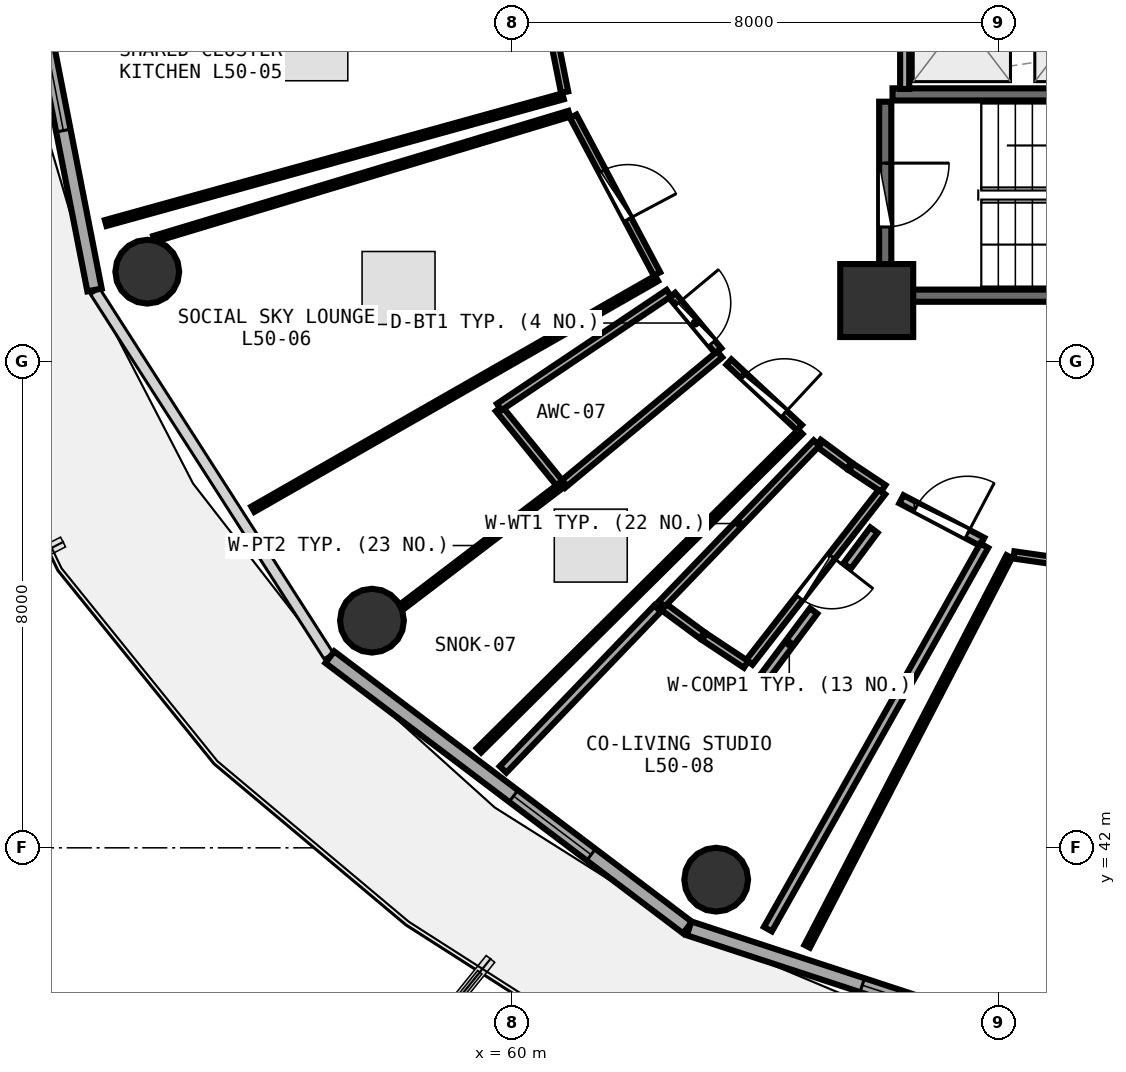
"""IFC4 building model, lengths in metres.
Left out: names, types, materials, properties, quantities, classifications, styles, units other than length and angle.
Written with IfcOpenShell. Run it as: python <this file> out.ifc"""

import sys

from ifc_helpers import new_model, si_unit, direction, frame, frame_2d, origin, origin_2d, place, context, subcontext, project, spatial, rectangle, circle, extrude, element, fill, save


model = new_model("IFC4")
c1 = context("Model", 3, precision=1e-05, world=origin(), true_north=direction((0.0, 1.0)))
c2 = subcontext(c1, "Body", "Model", "MODEL_VIEW")
j1 = project(units=[si_unit("LENGTHUNIT", "METRE"), si_unit("PLANEANGLEUNIT", "RADIAN")], contexts=[c1])
p1 = place(None, origin())
s1 = spatial("IfcSite", under=j1, at=p1, CompositionType="ELEMENT")
p2 = place(p1, origin())
s2 = spatial("IfcBuilding", under=s1, at=p2, CompositionType="ELEMENT")
p3 = place(p2, frame((0.0, 0.0, 196.95)))
s3 = spatial("IfcBuildingStorey", under=s2, at=p3, CompositionType="ELEMENT", Elevation=196.95)
p4 = place(p3, frame((66.0, 51.0, 0.0), z_axis=(0.0, 0.0, 1.0), x_axis=(1.0, 0.0, 0.0)))
e1 = element("IfcColumn", 1, at=p4, inside=s3, PredefinedType="PILASTER", context=c2, shape_type="SweptSolid", body=[
    extrude(rectangle(XDim=1.2, YDim=1.2, at=origin_2d()), origin(), (0.0, 0.0, 1.0), 3.75),
])
for number, where, z_axis, x_axis in (
    (2, (54.003, 51.474, 0.0), (0.0, 0.0, 1.0), (1.0, 0.0, 0.0)),
    (3, (57.698, 45.736, 0.0), (0.0, 0.0, 1.0), (1.0, 0.0, 0.0)),
    (4, (63.36, 41.476, 0.0), (0.0, 0.0, 1.0), (1.0, 0.0, 0.0)),
):
    element("IfcColumn", number, at=place(p3, frame(where, z_axis=z_axis, x_axis=x_axis)), inside=s3, PredefinedType="COLUMN", context=c2, shape_type="SweptSolid", body=[
        extrude(circle(Radius=0.525, at=origin_2d()), origin(), (0.0, 0.0, 1.0), 3.75),
    ])
p5 = place(p3, frame((51.803, 57.985, 0.0), z_axis=(0.0, 0.0, 1.0), x_axis=(0.192069055673, -0.981381413036, 0.0)))
e5 = element("IfcWall", 5, at=p5, inside=s3, PredefinedType="SOLIDWALL", context=c2, shape_type="SweptSolid", body=[
    extrude(rectangle(XDim=6.94, YDim=0.24, at=frame_2d((3.47, 0.0))), origin(), (0.0, 0.0, 1.0), 3.475),
])
p6 = place(p5, frame((2.67, 0.0, 0.85)))
e6 = element("IfcOpeningElement", 6, at=p6, cuts=e5, PredefinedType="OPENING", context=c2, shape_type="SweptSolid", body=[
    extrude(rectangle(XDim=1.6, YDim=1.45, at=frame_2d((0.8, 0.725))), frame((0.0, 0.13, 0.0), z_axis=(0.0, -1.0, 0.0), x_axis=(1.0, 0.0, 0.0)), (0.0, 0.0, 1.0), 0.26),
])
p7 = place(p3, frame((57.006, 45.135, 0.0), z_axis=(0.0, 0.0, 1.0), x_axis=(0.797701674595, -0.603052268338, 0.0)))
e7 = element("IfcWall", 7, at=p7, inside=s3, PredefinedType="SOLIDWALL", context=c2, shape_type="SweptSolid", body=[
    extrude(rectangle(XDim=7.374, YDim=0.24, at=frame_2d((3.687, 0.0))), origin(), (0.0, 0.0, 1.0), 3.475),
])
p8 = place(p7, frame((3.787, 0.0, 0.85)))
e8 = element("IfcOpeningElement", 8, at=p8, cuts=e7, PredefinedType="OPENING", context=c2, shape_type="SweptSolid", body=[
    extrude(rectangle(XDim=1.6, YDim=1.45, at=frame_2d((0.8, 0.725))), frame((0.0, 0.13, 0.0), z_axis=(0.0, -1.0, 0.0), x_axis=(1.0, 0.0, 0.0)), (0.0, 0.0, 1.0), 0.26),
])
p9 = place(p3, frame((62.914, 40.675, 0.0), z_axis=(0.0, 0.0, 1.0), x_axis=(0.95022142767, -0.31157541366, 0.0)))
e9 = element("IfcWall", 9, at=p9, inside=s3, PredefinedType="SOLIDWALL", context=c2, shape_type="SweptSolid", body=[
    extrude(rectangle(XDim=7.594, YDim=0.24, at=frame_2d((3.797, 0.0))), origin(), (0.0, 0.0, 1.0), 3.475),
])
p10 = place(p9, frame((2.997, 0.0, 0.85)))
e10 = element("IfcOpeningElement", 10, at=p10, cuts=e9, PredefinedType="OPENING", context=c2, shape_type="SweptSolid", body=[
    extrude(rectangle(XDim=1.6, YDim=1.45, at=frame_2d((0.8, 0.725))), frame((0.0, 0.13, 0.0), z_axis=(0.0, -1.0, 0.0), x_axis=(1.0, 0.0, 0.0)), (0.0, 0.0, 1.0), 0.26),
])
for number, where, z_axis, x_axis in (
    (11, (66.26, 51.08, 0.0), (0.0, 0.0, 1.0), (1.0, 0.0, 0.0)),
    (12, (73.42, 54.39, 0.0), (0.0, 0.0, 1.0), (-1.0, 0.0, 0.0)),
):
    element("IfcWall", number, at=place(p3, frame(where, z_axis=z_axis, x_axis=x_axis)), inside=s3, PredefinedType="SHEAR", context=c2, shape_type="SweptSolid", body=[
        extrude(rectangle(XDim=7.16, YDim=0.2, at=frame_2d((3.58, 0.0))), origin(), (0.0, 0.0, 1.0), 3.49),
    ])
p11 = place(p3, frame((66.14, 54.27, 0.0), z_axis=(0.0, 0.0, 1.0), x_axis=(0.0, -1.0, 0.0)))
e13 = element("IfcWall", 13, at=p11, inside=s3, PredefinedType="SHEAR", context=c2, shape_type="SweptSolid", body=[
    extrude(rectangle(XDim=3.07, YDim=0.2, at=frame_2d((1.535, 0.0))), origin(), (0.0, 0.0, 1.0), 3.49),
])
p12 = place(p11, frame((1.01, 0.0, 0.0)))
e14 = element("IfcOpeningElement", 14, at=p12, cuts=e13, PredefinedType="OPENING", context=c2, shape_type="SweptSolid", body=[
    extrude(rectangle(XDim=1.05, YDim=2.1, at=frame_2d((0.525, 1.05))), frame((0.0, 0.11, 0.0), z_axis=(0.0, -1.0, 0.0), x_axis=(1.0, 0.0, 0.0)), (0.0, 0.0, 1.0), 0.22),
])
p13 = place(p3, frame((66.46, 54.48, 0.0), z_axis=(0.0, 0.0, 1.0), x_axis=(0.0, 1.0, 0.0)))
e15 = element("IfcWall", 15, at=p13, inside=s3, PredefinedType="PARTITIONING", context=c2, shape_type="SweptSolid", body=[
    extrude(rectangle(XDim=2.29, YDim=0.15, at=frame_2d((1.145, 0.0))), origin(), (0.0, 0.0, 1.0), 3.48),
])
p14 = place(p3, frame((68.256, 46.816, 0.0), z_axis=(0.0, 0.0, 1.0), x_axis=(0.989926410659, -0.141582843167, 0.0)))
e16 = element("IfcWall", 16, at=p14, inside=s3, PredefinedType="PARTITIONING", context=c2, shape_type="SweptSolid", body=[
    extrude(rectangle(XDim=7.408, YDim=0.12, at=frame_2d((3.704, 0.0))), origin(), (0.0, 0.0, 1.0), 3.025),
])
p15 = place(p14, frame((3.254, 0.0, 0.0)))
e17 = element("IfcOpeningElement", 17, at=p15, cuts=e16, PredefinedType="OPENING", context=c2, shape_type="SweptSolid", body=[
    extrude(rectangle(XDim=0.9, YDim=2.08, at=frame_2d((0.45, 1.04))), frame((0.0, 0.07, 0.0), z_axis=(0.0, -1.0, 0.0), x_axis=(1.0, 0.0, 0.0)), (0.0, 0.0, 1.0), 0.14),
])
p16 = place(p3, frame((60.303, 57.253, 0.0), z_axis=(0.0, 0.0, 1.0), x_axis=(0.195904296331, -0.980623019656, 0.0)))
e18 = element("IfcWall", 18, at=p16, inside=s3, PredefinedType="PARTITIONING", context=c2, shape_type="SweptSolid", body=[
    extrude(rectangle(XDim=2.881, YDim=0.12, at=frame_2d((1.441, 0.0))), origin(), (0.0, 0.0, 1.0), 3.48),
])
p17 = place(p16, frame((0.991, 0.0, 0.0)))
e19 = element("IfcOpeningElement", 19, at=p17, cuts=e18, PredefinedType="OPENING", context=c2, shape_type="SweptSolid", body=[
    extrude(rectangle(XDim=0.9, YDim=2.08, at=frame_2d((0.45, 1.04))), frame((0.0, 0.07, 0.0), z_axis=(0.0, -1.0, 0.0), x_axis=(1.0, 0.0, 0.0)), (0.0, 0.0, 1.0), 0.14),
])
p18 = place(p3, frame((61.009, 54.03, 0.0), z_axis=(0.0, 0.0, 1.0), x_axis=(0.468999166779, -0.883198608219, 0.0)))
e20 = element("IfcWall", 20, at=p18, inside=s3, PredefinedType="PARTITIONING", context=c2, shape_type="SweptSolid", body=[
    extrude(rectangle(XDim=2.936, YDim=0.12, at=frame_2d((1.468, 0.0))), origin(), (0.0, 0.0, 1.0), 3.235),
])
p19 = place(p18, frame((1.018, 0.0, 0.0)))
e21 = element("IfcOpeningElement", 21, at=p19, cuts=e20, PredefinedType="OPENING", context=c2, shape_type="SweptSolid", body=[
    extrude(rectangle(XDim=0.9, YDim=2.08, at=frame_2d((0.45, 1.04))), frame((0.0, 0.07, 0.0), z_axis=(0.0, -1.0, 0.0), x_axis=(1.0, 0.0, 0.0)), (0.0, 0.0, 1.0), 0.14),
])
p20 = place(p3, frame((62.635, 51.086, 0.0), z_axis=(0.0, 0.0, 1.0), x_axis=(0.639759255057, -0.768575367526, 0.0)))
e22 = element("IfcWall", 22, at=p20, inside=s3, PredefinedType="PLUMBINGWALL", context=c2, shape_type="SweptSolid", body=[
    extrude(rectangle(XDim=1.187, YDim=0.13, at=frame_2d((0.593, 0.0))), origin(), (0.0, 0.0, 1.0), 3.025),
])
p21 = place(p20, frame((0.163, 0.0, 0.0)))
e23 = element("IfcOpeningElement", 23, at=p21, cuts=e22, PredefinedType="OPENING", context=c2, shape_type="SweptSolid", body=[
    extrude(rectangle(XDim=0.86, YDim=2.05, at=frame_2d((0.43, 1.025))), frame((0.0, 0.075, 0.0), z_axis=(0.0, -1.0, 0.0), x_axis=(1.0, 0.0, 0.0)), (0.0, 0.0, 1.0), 0.15),
])
p22 = place(p3, frame((63.569, 49.988, 0.0), z_axis=(0.0, 0.0, 1.0), x_axis=(0.732453034456, -0.680817561698, 0.0)))
e24 = element("IfcWall", 24, at=p22, inside=s3, PredefinedType="PARTITIONING", context=c2, shape_type="SweptSolid", body=[
    extrude(rectangle(XDim=1.584, YDim=0.12, at=frame_2d((0.792, 0.0))), origin(), (0.0, 0.0, 1.0), 3.025),
])
p23 = place(p22, frame((0.342, 0.0, 0.0)))
e25 = element("IfcOpeningElement", 25, at=p23, cuts=e24, PredefinedType="OPENING", context=c2, shape_type="SweptSolid", body=[
    extrude(rectangle(XDim=0.9, YDim=2.08, at=frame_2d((0.45, 1.04))), frame((0.0, 0.07, 0.0), z_axis=(0.0, -1.0, 0.0), x_axis=(1.0, 0.0, 0.0)), (0.0, 0.0, 1.0), 0.14),
])
p24 = place(p3, frame((66.088, 47.853, 0.0), z_axis=(0.0, 0.0, 1.0), x_axis=(-0.614711227896, -0.788752246462, 0.0)))
e26 = element("IfcWall", 26, at=p24, inside=s3, PredefinedType="PLUMBINGWALL", context=c2, shape_type="SweptSolid", body=[
    extrude(rectangle(XDim=3.552, YDim=0.13, at=frame_2d((1.776, 0.0))), origin(), (0.0, 0.0, 1.0), 3.025),
])
p25 = place(p24, frame((1.346, 0.0, 0.0)))
e27 = element("IfcOpeningElement", 27, at=p25, cuts=e26, PredefinedType="OPENING", context=c2, shape_type="SweptSolid", body=[
    extrude(rectangle(XDim=0.86, YDim=2.05, at=frame_2d((0.43, 1.025))), frame((0.0, 0.075, 0.0), z_axis=(0.0, -1.0, 0.0), x_axis=(1.0, 0.0, 0.0)), (0.0, 0.0, 1.0), 0.15),
])
p26 = place(p3, frame((66.406, 47.732, 0.0), z_axis=(0.0, 0.0, 1.0), x_axis=(0.884766555002, -0.466034487083, 0.0)))
e28 = element("IfcWall", 28, at=p26, inside=s3, PredefinedType="PARTITIONING", context=c2, shape_type="SweptSolid", body=[
    extrude(rectangle(XDim=1.502, YDim=0.15, at=frame_2d((0.751, 0.0))), origin(), (0.0, 0.0, 1.0), 3.235),
])
p27 = place(p26, frame((0.276, 0.0, 0.0)))
e29 = element("IfcOpeningElement", 29, at=p27, cuts=e28, PredefinedType="OPENING", context=c2, shape_type="SweptSolid", body=[
    extrude(rectangle(XDim=0.95, YDim=2.08, at=frame_2d((0.475, 1.04))), frame((0.0, 0.085, 0.0), z_axis=(0.0, -1.0, 0.0), x_axis=(1.0, 0.0, 0.0)), (0.0, 0.0, 1.0), 0.17),
])
p28 = place(p3, frame((64.856, 40.381, 0.0), z_axis=(0.0, 0.0, 1.0), x_axis=(0.460220418691, 0.887804689231, 0.0)))
e30 = element("IfcWall", 30, at=p28, inside=s3, PredefinedType="PARTITIONING", context=c2, shape_type="SweptSolid", body=[
    extrude(rectangle(XDim=7.219, YDim=0.1, at=frame_2d((3.609, 0.0))), origin(), (0.0, 0.0, 1.0), 3.075),
])
p29 = place(p3, frame((60.841, 54.358, 0.0), z_axis=(0.0, 0.0, 1.0), x_axis=(-0.963696964369, -0.266998428582, 0.0)))
e31 = element("IfcWall", 31, at=p29, inside=s3, PredefinedType="PARTITIONING", context=c2, shape_type="SweptSolid", body=[
    extrude(rectangle(XDim=7.804, YDim=0.1, at=frame_2d((3.902, 0.0))), origin(), (0.0, 0.0, 1.0), 3.075),
])
p30 = place(p3, frame((62.379, 51.364, 0.0), z_axis=(0.0, 0.0, 1.0), x_axis=(-0.868127220156, -0.496341746808, 0.0)))
e32 = element("IfcWall", 32, at=p30, inside=s3, PredefinedType="PARTITIONING", context=c2, shape_type="SweptSolid", body=[
    extrude(rectangle(XDim=7.648, YDim=0.1, at=frame_2d((3.824, 0.0))), origin(), (0.0, 0.0, 1.0), 3.025),
])
p31 = place(p3, frame((54.114, 52.013, 0.0), z_axis=(0.0, 0.0, 1.0), x_axis=(0.957454305291, 0.288584915198, 0.0)))
e33 = element("IfcWall", 33, at=p31, inside=s3, PredefinedType="PARTITIONING", context=c2, shape_type="SweptSolid", body=[
    extrude(rectangle(XDim=7.133, YDim=0.1, at=frame_2d((3.566, 0.0))), origin(), (0.0, 0.0, 1.0), 3.075),
])
p32 = place(p3, frame((63.417, 50.115, 0.0), z_axis=(0.0, 0.0, 1.0), x_axis=(-0.76963081868, -0.638489156477, 0.0)))
e34 = element("IfcWall", 34, at=p32, inside=s3, PredefinedType="PLUMBINGWALL", context=c2, shape_type="SweptSolid", body=[
    extrude(rectangle(XDim=3.36, YDim=0.13, at=frame_2d((1.68, 0.0))), origin(), (0.0, 0.0, 1.0), 3.175),
])
p33 = place(p3, frame((60.803, 47.972, 0.0), z_axis=(0.0, 0.0, 1.0), x_axis=(-0.631048835574, 0.775743106396, 0.0)))
e35 = element("IfcWall", 35, at=p33, inside=s3, PredefinedType="PLUMBINGWALL", context=c2, shape_type="SweptSolid", body=[
    extrude(rectangle(XDim=1.611, YDim=0.13, at=frame_2d((0.806, 0.0))), origin(), (0.0, 0.0, 1.0), 3.175),
])
p34 = place(p3, frame((59.791, 49.249, 0.0), z_axis=(0.0, 0.0, 1.0), x_axis=(0.830403176275, 0.557162960751, 0.0)))
e36 = element("IfcWall", 36, at=p34, inside=s3, PredefinedType="PLUMBINGWALL", context=c2, shape_type="SweptSolid", body=[
    extrude(rectangle(XDim=3.36, YDim=0.13, at=frame_2d((1.68, 0.0))), origin(), (0.0, 0.0, 1.0), 3.025),
])
p35 = place(p3, frame((64.745, 48.841, 0.0), z_axis=(0.0, 0.0, 1.0), x_axis=(-0.710363664194, -0.703834827635, 0.0)))
e37 = element("IfcWall", 37, at=p35, inside=s3, PredefinedType="PARTITIONING", context=c2, shape_type="SweptSolid", body=[
    extrude(rectangle(XDim=7.441, YDim=0.1, at=frame_2d((3.721, 0.0))), origin(), (0.0, 0.0, 1.0), 3.075),
])
p36 = place(p3, frame((58.197, 45.969, 0.0), z_axis=(0.0, 0.0, 1.0), x_axis=(0.79535379018, 0.606145484555, 0.0)))
e38 = element("IfcWall", 38, at=p36, inside=s3, PredefinedType="PARTITIONING", context=c2, shape_type="SweptSolid", body=[
    extrude(rectangle(XDim=3.308, YDim=0.1, at=frame_2d((1.654, 0.0))), origin(), (0.0, 0.0, 1.0), 3.025),
])
p37 = place(p3, frame((65.04, 48.658, 0.0), z_axis=(0.0, 0.0, 1.0), x_axis=(0.804987739936, -0.593291444867, 0.0)))
e39 = element("IfcWall", 39, at=p37, inside=s3, PredefinedType="PLUMBINGWALL", context=c2, shape_type="SweptSolid", body=[
    extrude(rectangle(XDim=0.631, YDim=0.13, at=frame_2d((0.315, 0.0))), origin(), (0.0, 0.0, 1.0), 3.025),
])
p38 = place(p3, frame((65.581, 48.261, 0.0), z_axis=(0.0, 0.0, 1.0), x_axis=(0.83341242139, -0.55265155014, 0.0)))
e40 = element("IfcWall", 40, at=p38, inside=s3, PredefinedType="PLUMBINGWALL", context=c2, shape_type="SweptSolid", body=[
    extrude(rectangle(XDim=0.633, YDim=0.13, at=frame_2d((0.316, 0.0))), origin(), (0.0, 0.0, 1.0), 3.48),
])
p39 = place(p3, frame((63.851, 45.015, 0.0), z_axis=(0.0, 0.0, 1.0), x_axis=(-0.833365951339, 0.552721621749, 0.0)))
e41 = element("IfcWall", 41, at=p39, inside=s3, PredefinedType="PLUMBINGWALL", context=c2, shape_type="SweptSolid", body=[
    extrude(rectangle(XDim=0.826, YDim=0.13, at=frame_2d((0.413, 0.0))), origin(), (0.0, 0.0, 1.0), 3.48),
])
p40 = place(p3, frame((63.13, 45.495, 0.0), z_axis=(0.0, 0.0, 1.0), x_axis=(-0.805130367536, 0.593097876638, 0.0)))
e42 = element("IfcWall", 42, at=p40, inside=s3, PredefinedType="PLUMBINGWALL", context=c2, shape_type="SweptSolid", body=[
    extrude(rectangle(XDim=0.823, YDim=0.13, at=frame_2d((0.412, 0.0))), origin(), (0.0, 0.0, 1.0), 3.48),
])
p41 = place(p3, frame((62.465, 46.01, 0.0), z_axis=(0.0, 0.0, 1.0), x_axis=(0.693241598237, 0.720705270186, 0.0)))
e43 = element("IfcWall", 43, at=p41, inside=s3, PredefinedType="PLUMBINGWALL", context=c2, shape_type="SweptSolid", body=[
    extrude(rectangle(XDim=3.671, YDim=0.13, at=frame_2d((1.836, 0.0))), origin(), (0.0, 0.0, 1.0), 3.175),
])
p42 = place(p3, frame((67.768, 46.969, 0.0), z_axis=(0.0, 0.0, 1.0), x_axis=(-0.491338239217, -0.870968848285, 0.0)))
e44 = element("IfcWall", 44, at=p42, inside=s3, PredefinedType="PARTITIONING", context=c2, shape_type="SweptSolid", body=[
    extrude(rectangle(XDim=7.241, YDim=0.15, at=frame_2d((3.62, 0.0))), origin(), (0.0, 0.0, 1.0), 3.075),
])
p43 = place(p3, frame((59.855, 43.288, 0.0), z_axis=(0.0, 0.0, 1.0), x_axis=(0.692562282737, 0.72135808343, 0.0)))
e45 = element("IfcWall", 45, at=p43, inside=s3, PredefinedType="PARTITIONING", context=c2, shape_type="SweptSolid", body=[
    extrude(rectangle(XDim=3.671, YDim=0.15, at=frame_2d((1.835, 0.0))), origin(), (0.0, 0.0, 1.0), 3.075),
])
p44 = place(p3, frame((64.162, 44.823, 0.0), z_axis=(0.0, 0.0, 1.0), x_axis=(0.597925227294, 0.801551883889, 0.0)))
e46 = element("IfcWall", 46, at=p44, inside=s3, PredefinedType="PARTITIONING", context=c2, shape_type="SweptSolid", body=[
    extrude(rectangle(XDim=1.338, YDim=0.15, at=frame_2d((0.669, 0.0))), origin(), (0.0, 0.0, 1.0), 3.025),
])
p45 = place(p3, frame((65.512, 46.633, 0.0), z_axis=(0.0, 0.0, 1.0), x_axis=(0.598093921347, 0.801426017327, 0.0)))
e47 = element("IfcWall", 47, at=p45, inside=s3, PredefinedType="PARTITIONING", context=c2, shape_type="SweptSolid", body=[
    extrude(rectangle(XDim=0.739, YDim=0.15, at=frame_2d((0.369, 0.0))), origin(), (0.0, 0.0, 1.0), 3.235),
])
p46 = place(p6, origin())
e48 = element("IfcWindow", 48, at=p46, inside=s3, PartitioningType="SINGLE_PANEL", PredefinedType="WINDOW", context=c2, shape_type="SweptSolid", body=[
    extrude(rectangle(XDim=1.6, YDim=1.45, at=frame_2d((0.8, 0.725))), frame((0.0, 0.03, 0.0), z_axis=(0.0, -1.0, 0.0), x_axis=(1.0, 0.0, 0.0)), (0.0, 0.0, 1.0), 0.06),
])
fill(e6, e48)
p47 = place(p8, origin())
e49 = element("IfcWindow", 49, at=p47, inside=s3, PartitioningType="SINGLE_PANEL", PredefinedType="WINDOW", context=c2, shape_type="SweptSolid", body=[
    extrude(rectangle(XDim=1.6, YDim=1.45, at=frame_2d((0.8, 0.725))), frame((0.0, 0.03, 0.0), z_axis=(0.0, -1.0, 0.0), x_axis=(1.0, 0.0, 0.0)), (0.0, 0.0, 1.0), 0.06),
])
fill(e8, e49)
p48 = place(p10, origin())
e50 = element("IfcWindow", 50, at=p48, inside=s3, PartitioningType="SINGLE_PANEL", PredefinedType="WINDOW", context=c2, shape_type="SweptSolid", body=[
    extrude(rectangle(XDim=1.6, YDim=1.45, at=frame_2d((0.8, 0.725))), frame((0.0, 0.03, 0.0), z_axis=(0.0, -1.0, 0.0), x_axis=(1.0, 0.0, 0.0)), (0.0, 0.0, 1.0), 0.06),
])
fill(e10, e50)
p49 = place(p12, origin())
e51 = element("IfcDoor", 51, at=p49, inside=s3, OperationType="SINGLE_SWING_LEFT", PredefinedType="DOOR", context=c2, shape_type="SweptSolid", body=[
    extrude(rectangle(XDim=1.05, YDim=2.1, at=frame_2d((0.525, 1.05))), frame((0.0, 0.025, 0.0), z_axis=(0.0, -1.0, 0.0), x_axis=(1.0, 0.0, 0.0)), (0.0, 0.0, 1.0), 0.05),
])
fill(e14, e51)
p50 = place(p19, origin())
e52 = element("IfcDoor", 52, at=p50, inside=s3, OperationType="SINGLE_SWING_RIGHT", PredefinedType="DOOR", context=c2, shape_type="SweptSolid", body=[
    extrude(rectangle(XDim=0.9, YDim=2.08, at=frame_2d((0.45, 1.04))), frame((0.0, 0.025, 0.0), z_axis=(0.0, -1.0, 0.0), x_axis=(1.0, 0.0, 0.0)), (0.0, 0.0, 1.0), 0.05),
])
fill(e21, e52)
p51 = place(p21, origin())
e53 = element("IfcDoor", 53, at=p51, inside=s3, OperationType="SINGLE_SWING_LEFT", PredefinedType="DOOR", context=c2, shape_type="SweptSolid", body=[
    extrude(rectangle(XDim=0.86, YDim=2.05, at=frame_2d((0.43, 1.025))), frame((0.0, 0.025, 0.0), z_axis=(0.0, -1.0, 0.0), x_axis=(1.0, 0.0, 0.0)), (0.0, 0.0, 1.0), 0.05),
])
fill(e23, e53)
p52 = place(p23, origin())
e54 = element("IfcDoor", 54, at=p52, inside=s3, OperationType="SINGLE_SWING_RIGHT", PredefinedType="DOOR", context=c2, shape_type="SweptSolid", body=[
    extrude(rectangle(XDim=0.9, YDim=2.08, at=frame_2d((0.45, 1.04))), frame((0.0, 0.025, 0.0), z_axis=(0.0, -1.0, 0.0), x_axis=(1.0, 0.0, 0.0)), (0.0, 0.0, 1.0), 0.05),
])
fill(e25, e54)
p53 = place(p25, origin())
e55 = element("IfcDoor", 55, at=p53, inside=s3, OperationType="SINGLE_SWING_LEFT", PredefinedType="DOOR", context=c2, shape_type="SweptSolid", body=[
    extrude(rectangle(XDim=0.86, YDim=2.05, at=frame_2d((0.43, 1.025))), frame((0.0, 0.025, 0.0), z_axis=(0.0, -1.0, 0.0), x_axis=(1.0, 0.0, 0.0)), (0.0, 0.0, 1.0), 0.05),
])
fill(e27, e55)
p54 = place(p27, origin())
e56 = element("IfcDoor", 56, at=p54, inside=s3, OperationType="SINGLE_SWING_RIGHT", PredefinedType="DOOR", context=c2, shape_type="SweptSolid", body=[
    extrude(rectangle(XDim=0.95, YDim=2.08, at=frame_2d((0.475, 1.04))), frame((0.0, 0.025, 0.0), z_axis=(0.0, -1.0, 0.0), x_axis=(1.0, 0.0, 0.0)), (0.0, 0.0, 1.0), 0.05),
])
fill(e29, e56)
save(model, sys.argv[1])
